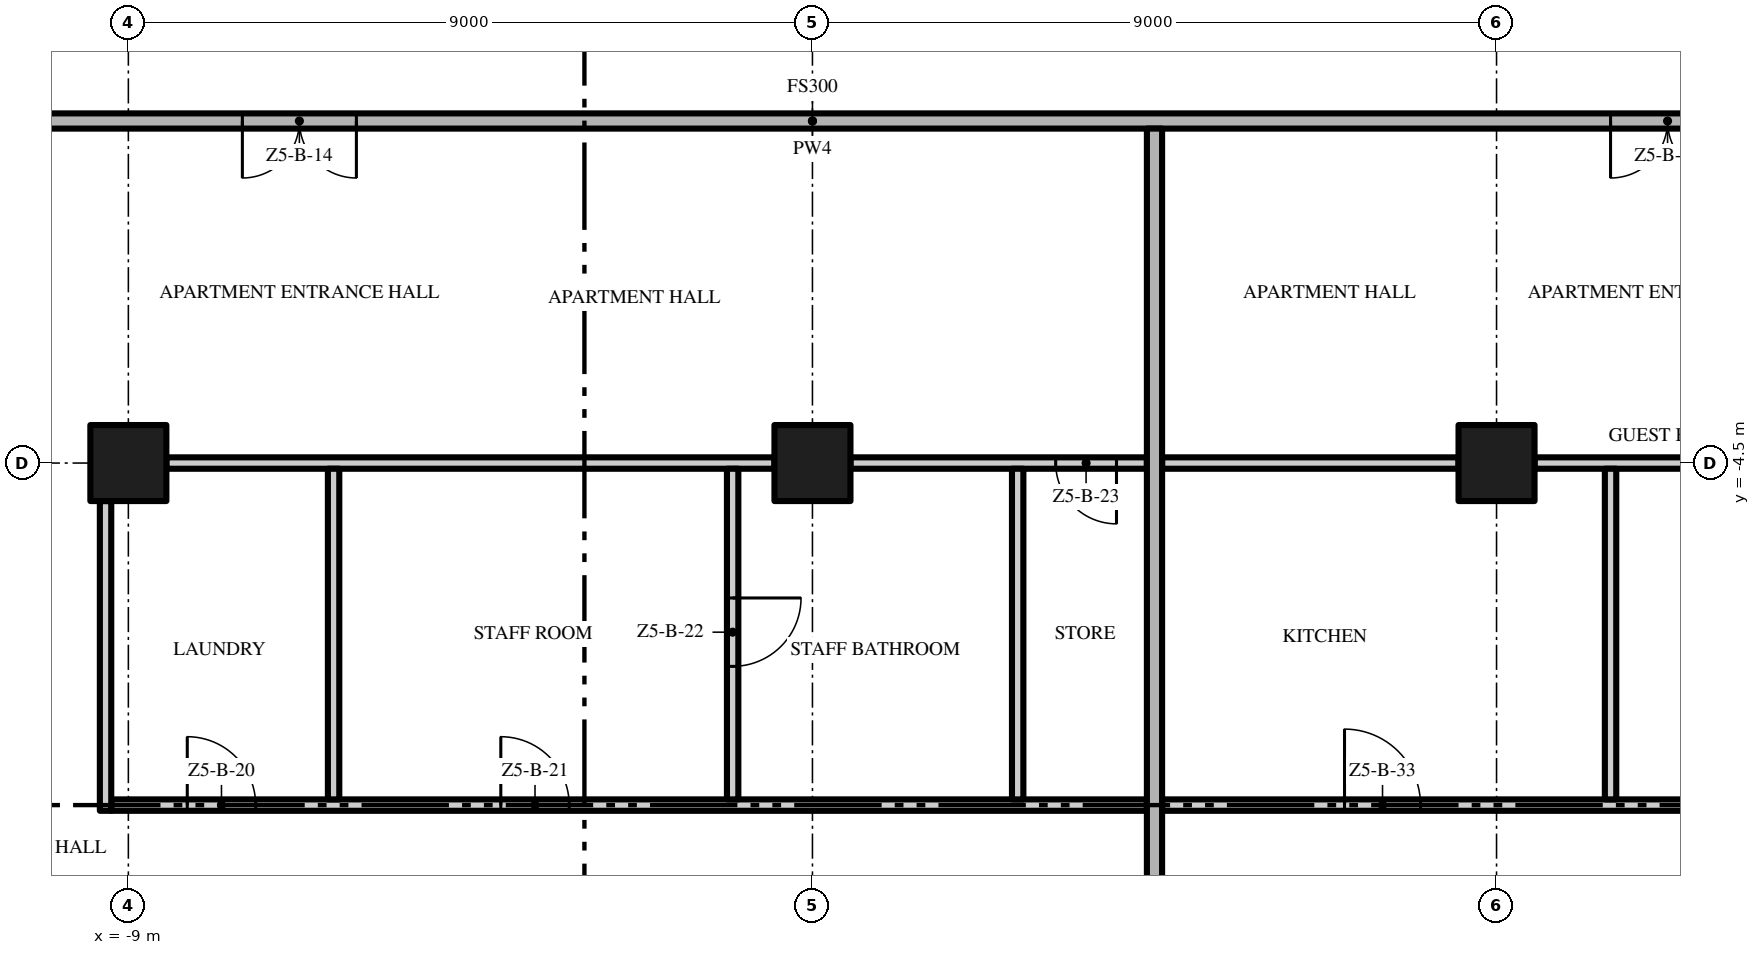
"""IFC4 building model, lengths in metres.
Left out: names, types, materials, properties, quantities, classifications, styles, units other than length and angle.
Written with IfcOpenShell. Run it as: python <this file> out.ifc"""

import sys

from ifc_helpers import new_model, si_unit, direction, frame, frame_2d, origin, origin_2d, place, context, subcontext, project, spatial, rectangle, extrude, element, fill, save


model = new_model("IFC4")
c1 = context("Model", 3, precision=1e-05, world=origin(), true_north=direction((0.0, 1.0)))
c2 = subcontext(c1, "Body", "Model", "MODEL_VIEW")
j1 = project(units=[si_unit("LENGTHUNIT", "METRE"), si_unit("PLANEANGLEUNIT", "RADIAN")], contexts=[c1])
p1 = place(None, origin())
s1 = spatial("IfcSite", under=j1, at=p1, CompositionType="ELEMENT")
p2 = place(p1, origin())
s2 = spatial("IfcBuilding", under=s1, at=p2, CompositionType="ELEMENT")
p3 = place(p2, frame((0.0, 0.0, 254.0)))
s3 = spatial("IfcBuildingStorey", under=s2, at=p3, CompositionType="ELEMENT", Elevation=254.0)
for number, where, z_axis, x_axis in (
    (1, (-9.0, -4.5, 0.0), (0.0, 0.0, 1.0), (1.0, 0.0, 0.0)),
    (2, (0.0, -4.5, 0.0), (0.0, 0.0, 1.0), (1.0, 0.0, 0.0)),
    (3, (9.0, -4.5, 0.0), (0.0, 0.0, 1.0), (1.0, 0.0, 0.0)),
):
    element("IfcColumn", number, at=place(p3, frame(where, z_axis=z_axis, x_axis=x_axis)), inside=s3, PredefinedType="COLUMN", context=c2, shape_type="SweptSolid", body=[
        extrude(rectangle(XDim=1.0, YDim=1.0, at=origin_2d()), origin(), (0.0, 0.0, 1.0), 3.5),
    ])
p4 = place(p3, frame((-9.225, -9.0, 0.0), z_axis=(0.0, 0.0, 1.0), x_axis=(1.0, 0.0, 0.0)))
e4 = element("IfcWall", 4, at=p4, inside=s3, PredefinedType="PARTITIONING", context=c2, shape_type="SweptSolid", body=[
    extrude(rectangle(XDim=13.625, YDim=0.15, at=frame_2d((6.812, 0.0))), origin(), (0.0, 0.0, 1.0), 3.5),
])
p5 = place(p4, frame((1.0, 0.0, 0.0)))
e5 = element("IfcOpeningElement", 5, at=p5, cuts=e4, PredefinedType="OPENING", context=c2, shape_type="SweptSolid", body=[
    extrude(rectangle(XDim=0.9, YDim=2.1, at=frame_2d((0.45, 1.05))), frame((0.0, 0.085, 0.0), z_axis=(0.0, -1.0, 0.0), x_axis=(1.0, 0.0, 0.0)), (0.0, 0.0, 1.0), 0.17),
])
p6 = place(p4, frame((5.125, 0.0, 0.0)))
e6 = element("IfcOpeningElement", 6, at=p6, cuts=e4, PredefinedType="OPENING", context=c2, shape_type="SweptSolid", body=[
    extrude(rectangle(XDim=0.9, YDim=2.1, at=frame_2d((0.45, 1.05))), frame((0.0, 0.085, 0.0), z_axis=(0.0, -1.0, 0.0), x_axis=(1.0, 0.0, 0.0)), (0.0, 0.0, 1.0), 0.17),
])
p7 = place(p3, frame((4.6, -9.0, 0.0), z_axis=(0.0, 0.0, 1.0), x_axis=(1.0, 0.0, 0.0)))
e7 = element("IfcWall", 7, at=p7, inside=s3, PredefinedType="PARTITIONING", context=c2, shape_type="SweptSolid", body=[
    extrude(rectangle(XDim=8.075, YDim=0.15, at=frame_2d((4.037, 0.0))), origin(), (0.0, 0.0, 1.0), 3.5),
])
p8 = place(p7, frame((2.4, 0.0, 0.0)))
e8 = element("IfcOpeningElement", 8, at=p8, cuts=e7, PredefinedType="OPENING", context=c2, shape_type="SweptSolid", body=[
    extrude(rectangle(XDim=1.0, YDim=2.4, at=frame_2d((0.5, 1.2))), frame((0.0, 0.085, 0.0), z_axis=(0.0, -1.0, 0.0), x_axis=(1.0, 0.0, 0.0)), (0.0, 0.0, 1.0), 0.17),
])
p9 = place(p3, frame((-8.5, -4.5, 0.0), z_axis=(0.0, 0.0, 1.0), x_axis=(1.0, 0.0, 0.0)))
e9 = element("IfcWall", 9, at=p9, inside=s3, PredefinedType="PARTITIONING", context=c2, shape_type="SweptSolid", body=[
    extrude(rectangle(XDim=8.0, YDim=0.15, at=frame_2d((4.0, 0.0))), origin(), (0.0, 0.0, 1.0), 3.5),
])
p10 = place(p3, frame((4.4, -4.5, 0.0), z_axis=(0.0, 0.0, 1.0), x_axis=(-1.0, 0.0, 0.0)))
e10 = element("IfcWall", 10, at=p10, inside=s3, PredefinedType="PARTITIONING", context=c2, shape_type="SweptSolid", body=[
    extrude(rectangle(XDim=3.9, YDim=0.15, at=frame_2d((1.95, 0.0))), origin(), (0.0, 0.0, 1.0), 3.5),
])
p11 = place(p10, frame((0.4, 0.0, 0.0)))
e11 = element("IfcOpeningElement", 11, at=p11, cuts=e10, PredefinedType="OPENING", context=c2, shape_type="SweptSolid", body=[
    extrude(rectangle(XDim=0.8, YDim=2.0, at=frame_2d((0.4, 1.0))), frame((0.0, 0.085, 0.0), z_axis=(0.0, -1.0, 0.0), x_axis=(1.0, 0.0, 0.0)), (0.0, 0.0, 1.0), 0.17),
])
p12 = place(p3, frame((4.6, -4.5, 0.0), z_axis=(0.0, 0.0, 1.0), x_axis=(1.0, 0.0, 0.0)))
e12 = element("IfcWall", 12, at=p12, inside=s3, PredefinedType="PARTITIONING", context=c2, shape_type="SweptSolid", body=[
    extrude(rectangle(XDim=3.9, YDim=0.15, at=frame_2d((1.95, 0.0))), origin(), (0.0, 0.0, 1.0), 3.5),
])
p13 = place(p3, frame((9.5, -4.5, 0.0), z_axis=(0.0, 0.0, 1.0), x_axis=(1.0, 0.0, 0.0)))
e13 = element("IfcWall", 13, at=p13, inside=s3, PredefinedType="PARTITIONING", context=c2, shape_type="SweptSolid", body=[
    extrude(rectangle(XDim=4.0, YDim=0.15, at=frame_2d((2.0, 0.0))), origin(), (0.0, 0.0, 1.0), 3.5),
])
p14 = place(p3, frame((17.4, 0.0, 0.0), z_axis=(0.0, 0.0, 1.0), x_axis=(-1.0, 0.0, 0.0)))
e14 = element("IfcWall", 14, at=p14, inside=s3, PredefinedType="PARTITIONING", context=c2, shape_type="SweptSolid", body=[
    extrude(rectangle(XDim=34.8, YDim=0.2, at=frame_2d((17.4, 0.0))), origin(), (0.0, 0.0, 1.0), 3.5),
])
p15 = place(p14, frame((23.4, 0.0, 0.0)))
e15 = element("IfcOpeningElement", 15, at=p15, cuts=e14, PredefinedType="OPENING", context=c2, shape_type="SweptSolid", body=[
    extrude(rectangle(XDim=1.5, YDim=2.4, at=frame_2d((0.75, 1.2))), frame((0.0, 0.11, 0.0), z_axis=(0.0, -1.0, 0.0), x_axis=(1.0, 0.0, 0.0)), (0.0, 0.0, 1.0), 0.22),
])
p16 = place(p14, frame((5.4, 0.0, 0.0)))
e16 = element("IfcOpeningElement", 16, at=p16, cuts=e14, PredefinedType="OPENING", context=c2, shape_type="SweptSolid", body=[
    extrude(rectangle(XDim=1.5, YDim=2.4, at=frame_2d((0.75, 1.2))), frame((0.0, 0.11, 0.0), z_axis=(0.0, -1.0, 0.0), x_axis=(1.0, 0.0, 0.0)), (0.0, 0.0, 1.0), 0.22),
])
p17 = place(p3, frame((-9.3, -9.075, 0.0), z_axis=(0.0, 0.0, 1.0), x_axis=(0.0, 1.0, 0.0)))
e17 = element("IfcWall", 17, at=p17, inside=s3, PredefinedType="PARTITIONING", context=c2, shape_type="SweptSolid", body=[
    extrude(rectangle(XDim=4.075, YDim=0.15, at=frame_2d((2.038, 0.0))), origin(), (0.0, 0.0, 1.0), 3.5),
])
p18 = place(p3, frame((-6.3, -8.925, 0.0), z_axis=(0.0, 0.0, 1.0), x_axis=(0.0, 1.0, 0.0)))
e18 = element("IfcWall", 18, at=p18, inside=s3, PredefinedType="PARTITIONING", context=c2, shape_type="SweptSolid", body=[
    extrude(rectangle(XDim=4.35, YDim=0.15, at=frame_2d((2.175, 0.0))), origin(), (0.0, 0.0, 1.0), 3.5),
])
p19 = place(p3, frame((-1.05, -4.575, 0.0), z_axis=(0.0, 0.0, 1.0), x_axis=(0.0, -1.0, 0.0)))
e19 = element("IfcWall", 19, at=p19, inside=s3, PredefinedType="PARTITIONING", context=c2, shape_type="SweptSolid", body=[
    extrude(rectangle(XDim=4.35, YDim=0.15, at=frame_2d((2.175, 0.0))), origin(), (0.0, 0.0, 1.0), 3.5),
])
p20 = place(p19, frame((1.7, 0.0, 0.0)))
e20 = element("IfcOpeningElement", 20, at=p20, cuts=e19, PredefinedType="OPENING", context=c2, shape_type="SweptSolid", body=[
    extrude(rectangle(XDim=0.9, YDim=2.1, at=frame_2d((0.45, 1.05))), frame((0.0, 0.085, 0.0), z_axis=(0.0, -1.0, 0.0), x_axis=(1.0, 0.0, 0.0)), (0.0, 0.0, 1.0), 0.17),
])
p21 = place(p3, frame((2.7, -8.925, 0.0), z_axis=(0.0, 0.0, 1.0), x_axis=(0.0, 1.0, 0.0)))
e21 = element("IfcWall", 21, at=p21, inside=s3, PredefinedType="PARTITIONING", context=c2, shape_type="SweptSolid", body=[
    extrude(rectangle(XDim=4.35, YDim=0.15, at=frame_2d((2.175, 0.0))), origin(), (0.0, 0.0, 1.0), 3.5),
])
p22 = place(p3, frame((4.5, -22.2, 0.0), z_axis=(0.0, 0.0, 1.0), x_axis=(0.0, 1.0, 0.0)))
e22 = element("IfcWall", 22, at=p22, inside=s3, PredefinedType="PARTITIONING", context=c2, shape_type="SweptSolid", body=[
    extrude(rectangle(XDim=22.1, YDim=0.2, at=frame_2d((11.05, 0.0))), origin(), (0.0, 0.0, 1.0), 3.5),
])
p23 = place(p3, frame((10.5, -8.925, 0.0), z_axis=(0.0, 0.0, 1.0), x_axis=(0.0, 1.0, 0.0)))
e23 = element("IfcWall", 23, at=p23, inside=s3, PredefinedType="PARTITIONING", context=c2, shape_type="SweptSolid", body=[
    extrude(rectangle(XDim=4.35, YDim=0.15, at=frame_2d((2.175, 0.0))), origin(), (0.0, 0.0, 1.0), 3.5),
])
p24 = place(p15, origin())
e24 = element("IfcDoor", 24, at=p24, inside=s3, OperationType="DOUBLE_DOOR_SINGLE_SWING", PredefinedType="DOOR", context=c2, shape_type="SweptSolid", body=[
    extrude(rectangle(XDim=1.5, YDim=2.4, at=frame_2d((0.75, 1.2))), frame((0.0, 0.025, 0.0), z_axis=(0.0, -1.0, 0.0), x_axis=(1.0, 0.0, 0.0)), (0.0, 0.0, 1.0), 0.05),
])
fill(e15, e24)
p25 = place(p5, origin())
e25 = element("IfcDoor", 25, at=p25, inside=s3, OperationType="SINGLE_SWING_LEFT", PredefinedType="DOOR", context=c2, shape_type="SweptSolid", body=[
    extrude(rectangle(XDim=0.9, YDim=2.1, at=frame_2d((0.45, 1.05))), frame((0.0, 0.025, 0.0), z_axis=(0.0, -1.0, 0.0), x_axis=(1.0, 0.0, 0.0)), (0.0, 0.0, 1.0), 0.05),
])
fill(e5, e25)
p26 = place(p6, origin())
e26 = element("IfcDoor", 26, at=p26, inside=s3, OperationType="SINGLE_SWING_LEFT", PredefinedType="DOOR", context=c2, shape_type="SweptSolid", body=[
    extrude(rectangle(XDim=0.9, YDim=2.1, at=frame_2d((0.45, 1.05))), frame((0.0, 0.025, 0.0), z_axis=(0.0, -1.0, 0.0), x_axis=(1.0, 0.0, 0.0)), (0.0, 0.0, 1.0), 0.05),
])
fill(e6, e26)
p27 = place(p20, origin())
e27 = element("IfcDoor", 27, at=p27, inside=s3, OperationType="SINGLE_SWING_LEFT", PredefinedType="DOOR", context=c2, shape_type="SweptSolid", body=[
    extrude(rectangle(XDim=0.9, YDim=2.1, at=frame_2d((0.45, 1.05))), frame((0.0, 0.025, 0.0), z_axis=(0.0, -1.0, 0.0), x_axis=(1.0, 0.0, 0.0)), (0.0, 0.0, 1.0), 0.05),
])
fill(e20, e27)
p28 = place(p11, origin())
e28 = element("IfcDoor", 28, at=p28, inside=s3, OperationType="SINGLE_SWING_LEFT", PredefinedType="DOOR", context=c2, shape_type="SweptSolid", body=[
    extrude(rectangle(XDim=0.8, YDim=2.0, at=frame_2d((0.4, 1.0))), frame((0.0, 0.025, 0.0), z_axis=(0.0, -1.0, 0.0), x_axis=(1.0, 0.0, 0.0)), (0.0, 0.0, 1.0), 0.05),
])
fill(e11, e28)
p29 = place(p16, origin())
e29 = element("IfcDoor", 29, at=p29, inside=s3, OperationType="DOUBLE_DOOR_SINGLE_SWING", PredefinedType="DOOR", context=c2, shape_type="SweptSolid", body=[
    extrude(rectangle(XDim=1.5, YDim=2.4, at=frame_2d((0.75, 1.2))), frame((0.0, 0.025, 0.0), z_axis=(0.0, -1.0, 0.0), x_axis=(1.0, 0.0, 0.0)), (0.0, 0.0, 1.0), 0.05),
])
fill(e16, e29)
p30 = place(p8, origin())
e30 = element("IfcDoor", 30, at=p30, inside=s3, OperationType="SINGLE_SWING_LEFT", PredefinedType="DOOR", context=c2, shape_type="SweptSolid", body=[
    extrude(rectangle(XDim=1.0, YDim=2.4, at=frame_2d((0.5, 1.2))), frame((0.0, 0.025, 0.0), z_axis=(0.0, -1.0, 0.0), x_axis=(1.0, 0.0, 0.0)), (0.0, 0.0, 1.0), 0.05),
])
fill(e8, e30)
save(model, sys.argv[1])
